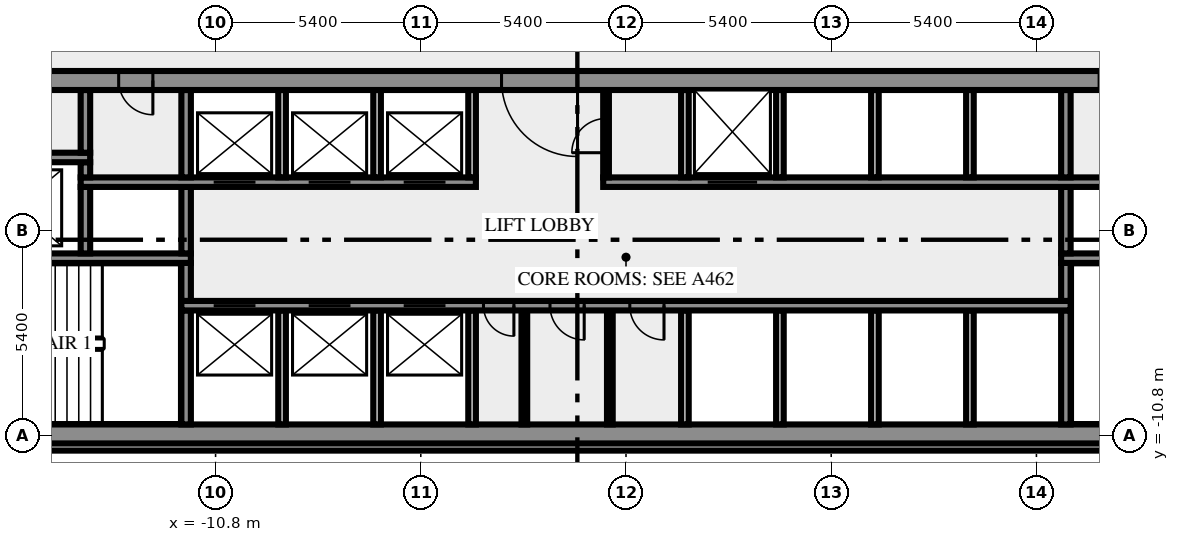
"""IFC4 building model, lengths in metres.
Left out: names, types, materials, properties, quantities, classifications, styles, units other than length and angle.
Written with IfcOpenShell. Run it as: python <this file> out.ifc"""

import sys

from ifc_helpers import new_model, si_unit, direction, frame, frame_2d, origin, place, context, subcontext, project, spatial, rectangle, extrude, element, fill, save


model = new_model("IFC4")
c1 = context("Model", 3, precision=1e-05, world=origin(), true_north=direction((0.0, 1.0)))
c2 = subcontext(c1, "Body", "Model", "MODEL_VIEW")
j1 = project(units=[si_unit("LENGTHUNIT", "METRE"), si_unit("PLANEANGLEUNIT", "RADIAN")], contexts=[c1])
p1 = place(None, origin())
s1 = spatial("IfcSite", under=j1, at=p1, CompositionType="ELEMENT")
p2 = place(p1, origin())
s2 = spatial("IfcBuilding", under=s1, at=p2, CompositionType="ELEMENT")
p3 = place(p2, frame((0.0, 0.0, 75.0)))
s3 = spatial("IfcBuildingStorey", under=s2, at=p3, CompositionType="ELEMENT", Elevation=75.0)
p4 = place(p3, frame((-17.444, -11.088, 0.0), z_axis=(0.0, 0.0, 1.0), x_axis=(1.0, 0.0, 0.0)))
e1 = element("IfcWall", 1, at=p4, inside=s3, PredefinedType="SOLIDWALL", context=c2, shape_type="SweptSolid", body=[
    extrude(rectangle(XDim=34.888, YDim=0.2, at=frame_2d((17.444, 0.0))), origin(), (0.0, 0.0, 1.0), 3.4),
])
p5 = place(p3, frame((-20.0, -10.75, 0.0), z_axis=(0.0, 0.0, 1.0), x_axis=(1.0, 0.0, 0.0)))
e2 = element("IfcWall", 2, at=p5, inside=s3, PredefinedType="SHEAR", context=c2, shape_type="SweptSolid", body=[
    extrude(rectangle(XDim=40.0, YDim=0.5, at=frame_2d((20.0, 0.0))), origin(), (0.0, 0.0, 1.0), 3.4),
])
p6 = place(p5, frame((0.8, 0.0, 1.0)))
e3 = element("IfcOpeningElement", 3, at=p6, cuts=e2, PredefinedType="OPENING", context=c2, shape_type="SweptSolid", body=[
    extrude(rectangle(XDim=1.2, YDim=1.2, at=frame_2d((0.6, 0.6))), frame((0.0, 0.26, 0.0), z_axis=(0.0, -1.0, 0.0), x_axis=(1.0, 0.0, 0.0)), (0.0, 0.0, 1.0), 0.52),
])
p7 = place(p5, frame((38.0, 0.0, 1.0)))
e4 = element("IfcOpeningElement", 4, at=p7, cuts=e2, PredefinedType="OPENING", context=c2, shape_type="SweptSolid", body=[
    extrude(rectangle(XDim=1.2, YDim=1.2, at=frame_2d((0.6, 0.6))), frame((0.0, 0.26, 0.0), z_axis=(0.0, -1.0, 0.0), x_axis=(1.0, 0.0, 0.0)), (0.0, 0.0, 1.0), 0.52),
])
p8 = place(p3, frame((-11.575, -10.5, 0.0), z_axis=(0.0, 0.0, 1.0), x_axis=(0.0, 1.0, 0.0)))
e5 = element("IfcWall", 5, at=p8, inside=s3, PredefinedType="SHEAR", context=c2, shape_type="SweptSolid", body=[
    extrude(rectangle(XDim=3.0, YDim=0.25, at=frame_2d((1.5, 0.0))), origin(), (0.0, 0.0, 1.0), 3.4),
])
for number, where, z_axis, x_axis in (
    (6, (-9.05, -10.5, 0.0), (0.0, 0.0, 1.0), (0.0, 1.0, 0.0)),
    (7, (-6.55, -10.5, 0.0), (0.0, 0.0, 1.0), (0.0, 1.0, 0.0)),
    (8, (-4.05, -10.5, 0.0), (0.0, 0.0, 1.0), (0.0, 1.0, 0.0)),
):
    element("IfcWall", number, at=place(p3, frame(where, z_axis=z_axis, x_axis=x_axis)), inside=s3, PredefinedType="SOLIDWALL", context=c2, shape_type="SweptSolid", body=[
        extrude(rectangle(XDim=3.0, YDim=0.2, at=frame_2d((1.5, 0.0))), origin(), (0.0, 0.0, 1.0), 3.4),
    ])
for number, where, z_axis, x_axis in (
    (9, (-2.675, -10.5, 0.0), (0.0, 0.0, 1.0), (0.0, 1.0, 0.0)),
    (10, (-0.425, -10.5, 0.0), (0.0, 0.0, 1.0), (0.0, 1.0, 0.0)),
):
    element("IfcWall", number, at=place(p3, frame(where, z_axis=z_axis, x_axis=x_axis)), inside=s3, PredefinedType="PARTITIONING", context=c2, shape_type="SweptSolid", body=[
        extrude(rectangle(XDim=3.0, YDim=0.15, at=frame_2d((1.5, 0.0))), origin(), (0.0, 0.0, 1.0), 3.4),
    ])
for number, where, z_axis, x_axis in (
    (11, (1.55, -10.5, 0.0), (0.0, 0.0, 1.0), (0.0, 1.0, 0.0)),
    (12, (4.05, -10.5, 0.0), (0.0, 0.0, 1.0), (0.0, 1.0, 0.0)),
    (13, (6.55, -10.5, 0.0), (0.0, 0.0, 1.0), (0.0, 1.0, 0.0)),
    (14, (9.05, -10.5, 0.0), (0.0, 0.0, 1.0), (0.0, 1.0, 0.0)),
):
    element("IfcWall", number, at=place(p3, frame(where, z_axis=z_axis, x_axis=x_axis)), inside=s3, PredefinedType="SOLIDWALL", context=c2, shape_type="SweptSolid", body=[
        extrude(rectangle(XDim=3.0, YDim=0.2, at=frame_2d((1.5, 0.0))), origin(), (0.0, 0.0, 1.0), 3.4),
    ])
p9 = place(p3, frame((11.575, -10.5, 0.0), z_axis=(0.0, 0.0, 1.0), x_axis=(0.0, 1.0, 0.0)))
e15 = element("IfcWall", 15, at=p9, inside=s3, PredefinedType="SHEAR", context=c2, shape_type="SweptSolid", body=[
    extrude(rectangle(XDim=3.0, YDim=0.25, at=frame_2d((1.5, 0.0))), origin(), (0.0, 0.0, 1.0), 3.4),
])
p10 = place(p3, frame((11.7, -7.375, 0.0), z_axis=(0.0, 0.0, 1.0), x_axis=(-1.0, 0.0, 0.0)))
e16 = element("IfcWall", 16, at=p10, inside=s3, PredefinedType="SHEAR", context=c2, shape_type="SweptSolid", body=[
    extrude(rectangle(XDim=23.4, YDim=0.25, at=frame_2d((11.7, 0.0))), origin(), (0.0, 0.0, 1.0), 3.4),
])
p11 = place(p10, frame((21.45, 0.0, 0.0)))
e17 = element("IfcOpeningElement", 17, at=p11, cuts=e16, PredefinedType="OPENING", context=c2, shape_type="SweptSolid", body=[
    extrude(rectangle(XDim=1.1, YDim=2.1, at=frame_2d((0.55, 1.05))), frame((0.0, 0.135, 0.0), z_axis=(0.0, -1.0, 0.0), x_axis=(1.0, 0.0, 0.0)), (0.0, 0.0, 1.0), 0.27),
])
p12 = place(p10, frame((18.95, 0.0, 0.0)))
e18 = element("IfcOpeningElement", 18, at=p12, cuts=e16, PredefinedType="OPENING", context=c2, shape_type="SweptSolid", body=[
    extrude(rectangle(XDim=1.1, YDim=2.1, at=frame_2d((0.55, 1.05))), frame((0.0, 0.135, 0.0), z_axis=(0.0, -1.0, 0.0), x_axis=(1.0, 0.0, 0.0)), (0.0, 0.0, 1.0), 0.27),
])
p13 = place(p10, frame((16.45, 0.0, 0.0)))
e19 = element("IfcOpeningElement", 19, at=p13, cuts=e16, PredefinedType="OPENING", context=c2, shape_type="SweptSolid", body=[
    extrude(rectangle(XDim=1.1, YDim=2.1, at=frame_2d((0.55, 1.05))), frame((0.0, 0.135, 0.0), z_axis=(0.0, -1.0, 0.0), x_axis=(1.0, 0.0, 0.0)), (0.0, 0.0, 1.0), 0.27),
])
p14 = place(p10, frame((14.65, 0.0, 0.0)))
e20 = element("IfcOpeningElement", 20, at=p14, cuts=e16, PredefinedType="OPENING", context=c2, shape_type="SweptSolid", body=[
    extrude(rectangle(XDim=0.8, YDim=2.1, at=frame_2d((0.4, 1.05))), frame((0.0, 0.135, 0.0), z_axis=(0.0, -1.0, 0.0), x_axis=(1.0, 0.0, 0.0)), (0.0, 0.0, 1.0), 0.27),
])
p15 = place(p10, frame((12.8, 0.0, 0.0)))
e21 = element("IfcOpeningElement", 21, at=p15, cuts=e16, PredefinedType="OPENING", context=c2, shape_type="SweptSolid", body=[
    extrude(rectangle(XDim=0.9, YDim=2.1, at=frame_2d((0.45, 1.05))), frame((0.0, 0.135, 0.0), z_axis=(0.0, -1.0, 0.0), x_axis=(1.0, 0.0, 0.0)), (0.0, 0.0, 1.0), 0.27),
])
p16 = place(p10, frame((10.7, 0.0, 0.0)))
e22 = element("IfcOpeningElement", 22, at=p16, cuts=e16, PredefinedType="OPENING", context=c2, shape_type="SweptSolid", body=[
    extrude(rectangle(XDim=0.9, YDim=2.1, at=frame_2d((0.45, 1.05))), frame((0.0, 0.135, 0.0), z_axis=(0.0, -1.0, 0.0), x_axis=(1.0, 0.0, 0.0)), (0.0, 0.0, 1.0), 0.27),
])
for number, where, z_axis, x_axis in (
    (23, (-11.575, -7.25, 0.0), (0.0, 0.0, 1.0), (0.0, 1.0, 0.0)),
    (24, (11.575, -7.25, 0.0), (0.0, 0.0, 1.0), (0.0, 1.0, 0.0)),
):
    element("IfcWall", number, at=place(p3, frame(where, z_axis=z_axis, x_axis=x_axis)), inside=s3, PredefinedType="SHEAR", context=c2, shape_type="SweptSolid", body=[
        extrude(rectangle(XDim=1.0, YDim=0.25, at=frame_2d((0.5, 0.0))), origin(), (0.0, 0.0, 1.0), 3.4),
    ])
p17 = place(p3, frame((-11.45, -6.125, 0.0), z_axis=(0.0, 0.0, 1.0), x_axis=(-1.0, 0.0, 0.0)))
e25 = element("IfcWall", 25, at=p17, inside=s3, PredefinedType="SHEAR", context=c2, shape_type="SweptSolid", body=[
    extrude(rectangle(XDim=8.05, YDim=0.25, at=frame_2d((4.025, 0.0))), origin(), (0.0, 0.0, 1.0), 3.4),
])
p18 = place(p17, frame((6.2, 0.0, 0.0)))
e26 = element("IfcOpeningElement", 26, at=p18, cuts=e25, PredefinedType="OPENING", context=c2, shape_type="SweptSolid", body=[
    extrude(rectangle(XDim=1.8, YDim=2.1, at=frame_2d((0.9, 1.05))), frame((0.0, 0.135, 0.0), z_axis=(0.0, -1.0, 0.0), x_axis=(1.0, 0.0, 0.0)), (0.0, 0.0, 1.0), 0.27),
])
p19 = place(p3, frame((19.5, -6.125, 0.0), z_axis=(0.0, 0.0, 1.0), x_axis=(-1.0, 0.0, 0.0)))
e27 = element("IfcWall", 27, at=p19, inside=s3, PredefinedType="SHEAR", context=c2, shape_type="SweptSolid", body=[
    extrude(rectangle(XDim=8.05, YDim=0.25, at=frame_2d((4.025, 0.0))), origin(), (0.0, 0.0, 1.0), 3.4),
])
p20 = place(p19, frame((0.05, 0.0, 0.0)))
e28 = element("IfcOpeningElement", 28, at=p20, cuts=e27, PredefinedType="OPENING", context=c2, shape_type="SweptSolid", body=[
    extrude(rectangle(XDim=1.8, YDim=2.1, at=frame_2d((0.9, 1.05))), frame((0.0, 0.135, 0.0), z_axis=(0.0, -1.0, 0.0), x_axis=(1.0, 0.0, 0.0)), (0.0, 0.0, 1.0), 0.27),
])
for number, where, z_axis, x_axis in (
    (29, (-14.225, -6.0, 0.0), (0.0, 0.0, 1.0), (0.0, 1.0, 0.0)),
    (30, (-11.575, -6.0, 0.0), (0.0, 0.0, 1.0), (0.0, 1.0, 0.0)),
    (31, (11.575, -6.0, 0.0), (0.0, 0.0, 1.0), (0.0, 1.0, 0.0)),
):
    element("IfcWall", number, at=place(p3, frame(where, z_axis=z_axis, x_axis=x_axis)), inside=s3, PredefinedType="SHEAR", context=c2, shape_type="SweptSolid", body=[
        extrude(rectangle(XDim=1.75, YDim=0.25, at=frame_2d((0.875, 0.0))), origin(), (0.0, 0.0, 1.0), 3.4),
    ])
p21 = place(p3, frame((-14.35, -4.125, 0.0), z_axis=(0.0, 0.0, 1.0), x_axis=(1.0, 0.0, 0.0)))
e32 = element("IfcWall", 32, at=p21, inside=s3, PredefinedType="SHEAR", context=c2, shape_type="SweptSolid", body=[
    extrude(rectangle(XDim=10.4, YDim=0.25, at=frame_2d((5.2, 0.0))), origin(), (0.0, 0.0, 1.0), 3.4),
])
p22 = place(p21, frame((3.5, 0.0, 0.0)))
e33 = element("IfcOpeningElement", 33, at=p22, cuts=e32, PredefinedType="OPENING", context=c2, shape_type="SweptSolid", body=[
    extrude(rectangle(XDim=1.1, YDim=2.1, at=frame_2d((0.55, 1.05))), frame((0.0, 0.135, 0.0), z_axis=(0.0, -1.0, 0.0), x_axis=(1.0, 0.0, 0.0)), (0.0, 0.0, 1.0), 0.27),
])
p23 = place(p21, frame((6.0, 0.0, 0.0)))
e34 = element("IfcOpeningElement", 34, at=p23, cuts=e32, PredefinedType="OPENING", context=c2, shape_type="SweptSolid", body=[
    extrude(rectangle(XDim=1.1, YDim=2.1, at=frame_2d((0.55, 1.05))), frame((0.0, 0.135, 0.0), z_axis=(0.0, -1.0, 0.0), x_axis=(1.0, 0.0, 0.0)), (0.0, 0.0, 1.0), 0.27),
])
p24 = place(p21, frame((8.5, 0.0, 0.0)))
e35 = element("IfcOpeningElement", 35, at=p24, cuts=e32, PredefinedType="OPENING", context=c2, shape_type="SweptSolid", body=[
    extrude(rectangle(XDim=1.1, YDim=2.1, at=frame_2d((0.55, 1.05))), frame((0.0, 0.135, 0.0), z_axis=(0.0, -1.0, 0.0), x_axis=(1.0, 0.0, 0.0)), (0.0, 0.0, 1.0), 0.27),
])
p25 = place(p3, frame((-0.6, -4.125, 0.0), z_axis=(0.0, 0.0, 1.0), x_axis=(1.0, 0.0, 0.0)))
e36 = element("IfcWall", 36, at=p25, inside=s3, PredefinedType="SHEAR", context=c2, shape_type="SweptSolid", body=[
    extrude(rectangle(XDim=14.95, YDim=0.25, at=frame_2d((7.475, 0.0))), origin(), (0.0, 0.0, 1.0), 3.4),
])
p26 = place(p25, frame((2.75, 0.0, 0.0)))
e37 = element("IfcOpeningElement", 37, at=p26, cuts=e36, PredefinedType="OPENING", context=c2, shape_type="SweptSolid", body=[
    extrude(rectangle(XDim=1.3, YDim=2.1, at=frame_2d((0.65, 1.05))), frame((0.0, 0.135, 0.0), z_axis=(0.0, -1.0, 0.0), x_axis=(1.0, 0.0, 0.0)), (0.0, 0.0, 1.0), 0.27),
])
p27 = place(p3, frame((-14.225, -4.0, 0.0), z_axis=(0.0, 0.0, 1.0), x_axis=(0.0, 1.0, 0.0)))
e38 = element("IfcWall", 38, at=p27, inside=s3, PredefinedType="SHEAR", context=c2, shape_type="SweptSolid", body=[
    extrude(rectangle(XDim=0.4, YDim=0.25, at=frame_2d((0.2, 0.0))), origin(), (0.0, 0.0, 1.0), 3.4),
])
p28 = place(p3, frame((-11.575, -4.0, 0.0), z_axis=(0.0, 0.0, 1.0), x_axis=(0.0, 1.0, 0.0)))
e39 = element("IfcWall", 39, at=p28, inside=s3, PredefinedType="SHEAR", context=c2, shape_type="SweptSolid", body=[
    extrude(rectangle(XDim=2.3, YDim=0.25, at=frame_2d((1.15, 0.0))), origin(), (0.0, 0.0, 1.0), 3.4),
])
for number, where, z_axis, x_axis in (
    (40, (-9.05, -4.0, 0.0), (0.0, 0.0, 1.0), (0.0, 1.0, 0.0)),
    (41, (-6.55, -4.0, 0.0), (0.0, 0.0, 1.0), (0.0, 1.0, 0.0)),
    (42, (-4.05, -4.0, 0.0), (0.0, 0.0, 1.0), (0.0, 1.0, 0.0)),
):
    element("IfcWall", number, at=place(p3, frame(where, z_axis=z_axis, x_axis=x_axis)), inside=s3, PredefinedType="SOLIDWALL", context=c2, shape_type="SweptSolid", body=[
        extrude(rectangle(XDim=2.3, YDim=0.2, at=frame_2d((1.15, 0.0))), origin(), (0.0, 0.0, 1.0), 3.4),
    ])
p29 = place(p3, frame((-0.525, -4.0, 0.0), z_axis=(0.0, 0.0, 1.0), x_axis=(0.0, 1.0, 0.0)))
e43 = element("IfcWall", 43, at=p29, inside=s3, PredefinedType="PARTITIONING", context=c2, shape_type="SweptSolid", body=[
    extrude(rectangle(XDim=2.3, YDim=0.15, at=frame_2d((1.15, 0.0))), origin(), (0.0, 0.0, 1.0), 3.4),
])
p30 = place(p29, frame((0.65, 0.0, 0.0)))
e44 = element("IfcOpeningElement", 44, at=p30, cuts=e43, PredefinedType="OPENING", context=c2, shape_type="SweptSolid", body=[
    extrude(rectangle(XDim=0.9, YDim=2.1, at=frame_2d((0.45, 1.05))), frame((0.0, 0.085, 0.0), z_axis=(0.0, -1.0, 0.0), x_axis=(1.0, 0.0, 0.0)), (0.0, 0.0, 1.0), 0.17),
])
for number, where, z_axis, x_axis in (
    (45, (1.55, -4.0, 0.0), (0.0, 0.0, 1.0), (0.0, 1.0, 0.0)),
    (46, (4.05, -4.0, 0.0), (0.0, 0.0, 1.0), (0.0, 1.0, 0.0)),
    (47, (6.55, -4.0, 0.0), (0.0, 0.0, 1.0), (0.0, 1.0, 0.0)),
    (48, (9.05, -4.0, 0.0), (0.0, 0.0, 1.0), (0.0, 1.0, 0.0)),
):
    element("IfcWall", number, at=place(p3, frame(where, z_axis=z_axis, x_axis=x_axis)), inside=s3, PredefinedType="SOLIDWALL", context=c2, shape_type="SweptSolid", body=[
        extrude(rectangle(XDim=2.3, YDim=0.2, at=frame_2d((1.15, 0.0))), origin(), (0.0, 0.0, 1.0), 3.4),
    ])
p31 = place(p3, frame((11.575, -4.0, 0.0), z_axis=(0.0, 0.0, 1.0), x_axis=(0.0, 1.0, 0.0)))
e49 = element("IfcWall", 49, at=p31, inside=s3, PredefinedType="SHEAR", context=c2, shape_type="SweptSolid", body=[
    extrude(rectangle(XDim=2.3, YDim=0.25, at=frame_2d((1.15, 0.0))), origin(), (0.0, 0.0, 1.0), 3.4),
])
p32 = place(p3, frame((-17.35, -3.475, 0.0), z_axis=(0.0, 0.0, 1.0), x_axis=(1.0, 0.0, 0.0)))
e50 = element("IfcWall", 50, at=p32, inside=s3, PredefinedType="SHEAR", context=c2, shape_type="SweptSolid", body=[
    extrude(rectangle(XDim=3.25, YDim=0.25, at=frame_2d((1.625, 0.0))), origin(), (0.0, 0.0, 1.0), 3.4),
])
p33 = place(p3, frame((-14.225, -3.35, 0.0), z_axis=(0.0, 0.0, 1.0), x_axis=(0.0, 1.0, 0.0)))
e51 = element("IfcWall", 51, at=p33, inside=s3, PredefinedType="SHEAR", context=c2, shape_type="SweptSolid", body=[
    extrude(rectangle(XDim=1.65, YDim=0.25, at=frame_2d((0.825, 0.0))), origin(), (0.0, 0.0, 1.0), 3.4),
])
p34 = place(p3, frame((20.49, -1.45, 0.0), z_axis=(0.0, 0.0, 1.0), x_axis=(-1.0, 0.0, 0.0)))
e52 = element("IfcWall", 52, at=p34, inside=s3, PredefinedType="SHEAR", context=c2, shape_type="SweptSolid", body=[
    extrude(rectangle(XDim=40.98, YDim=0.5, at=frame_2d((20.49, 0.0))), origin(), (0.0, 0.0, 1.0), 3.4),
])
p35 = place(p34, frame((38.14, 0.0, 0.0)))
e53 = element("IfcOpeningElement", 53, at=p35, cuts=e52, PredefinedType="OPENING", context=c2, shape_type="SweptSolid", body=[
    extrude(rectangle(XDim=1.8, YDim=2.1, at=frame_2d((0.9, 1.05))), frame((0.0, 0.26, 0.0), z_axis=(0.0, -1.0, 0.0), x_axis=(1.0, 0.0, 0.0)), (0.0, 0.0, 1.0), 0.52),
])
p36 = place(p34, frame((35.89, 0.0, 0.0)))
e54 = element("IfcOpeningElement", 54, at=p36, cuts=e52, PredefinedType="OPENING", context=c2, shape_type="SweptSolid", body=[
    extrude(rectangle(XDim=0.9, YDim=2.1, at=frame_2d((0.45, 1.05))), frame((0.0, 0.26, 0.0), z_axis=(0.0, -1.0, 0.0), x_axis=(1.0, 0.0, 0.0)), (0.0, 0.0, 1.0), 0.52),
])
p37 = place(p34, frame((32.94, 0.0, 0.0)))
e55 = element("IfcOpeningElement", 55, at=p37, cuts=e52, PredefinedType="OPENING", context=c2, shape_type="SweptSolid", body=[
    extrude(rectangle(XDim=0.9, YDim=2.1, at=frame_2d((0.45, 1.05))), frame((0.0, 0.26, 0.0), z_axis=(0.0, -1.0, 0.0), x_axis=(1.0, 0.0, 0.0)), (0.0, 0.0, 1.0), 0.52),
])
p38 = place(p34, frame((21.765, 0.0, 0.0)))
e56 = element("IfcOpeningElement", 56, at=p38, cuts=e52, PredefinedType="OPENING", context=c2, shape_type="SweptSolid", body=[
    extrude(rectangle(XDim=2.0, YDim=2.1, at=frame_2d((1.0, 1.05))), frame((0.0, 0.26, 0.0), z_axis=(0.0, -1.0, 0.0), x_axis=(1.0, 0.0, 0.0)), (0.0, 0.0, 1.0), 0.52),
])
p39 = place(p34, frame((7.14, 0.0, 0.0)))
e57 = element("IfcOpeningElement", 57, at=p39, cuts=e52, PredefinedType="OPENING", context=c2, shape_type="SweptSolid", body=[
    extrude(rectangle(XDim=0.9, YDim=2.1, at=frame_2d((0.45, 1.05))), frame((0.0, 0.26, 0.0), z_axis=(0.0, -1.0, 0.0), x_axis=(1.0, 0.0, 0.0)), (0.0, 0.0, 1.0), 0.52),
])
p40 = place(p34, frame((5.028, 0.0, 0.0)))
e58 = element("IfcOpeningElement", 58, at=p40, cuts=e52, PredefinedType="OPENING", context=c2, shape_type="SweptSolid", body=[
    extrude(rectangle(XDim=0.8, YDim=2.1, at=frame_2d((0.4, 1.05))), frame((0.0, 0.26, 0.0), z_axis=(0.0, -1.0, 0.0), x_axis=(1.0, 0.0, 0.0)), (0.0, 0.0, 1.0), 0.52),
])
p41 = place(p34, frame((3.452, 0.0, 0.0)))
e59 = element("IfcOpeningElement", 59, at=p41, cuts=e52, PredefinedType="OPENING", context=c2, shape_type="SweptSolid", body=[
    extrude(rectangle(XDim=0.8, YDim=2.1, at=frame_2d((0.4, 1.05))), frame((0.0, 0.26, 0.0), z_axis=(0.0, -1.0, 0.0), x_axis=(1.0, 0.0, 0.0)), (0.0, 0.0, 1.0), 0.52),
])
p42 = place(p34, frame((1.04, 0.0, 0.0)))
e60 = element("IfcOpeningElement", 60, at=p42, cuts=e52, PredefinedType="OPENING", context=c2, shape_type="SweptSolid", body=[
    extrude(rectangle(XDim=1.8, YDim=2.1, at=frame_2d((0.9, 1.05))), frame((0.0, 0.26, 0.0), z_axis=(0.0, -1.0, 0.0), x_axis=(1.0, 0.0, 0.0)), (0.0, 0.0, 1.0), 0.52),
])
p43 = place(p11, origin())
e61 = element("IfcDoor", 61, at=p43, inside=s3, OperationType="DOUBLE_DOOR_SLIDING", PredefinedType="DOOR", context=c2, shape_type="SweptSolid", body=[
    extrude(rectangle(XDim=1.1, YDim=2.1, at=frame_2d((0.55, 1.05))), frame((0.0, 0.025, 0.0), z_axis=(0.0, -1.0, 0.0), x_axis=(1.0, 0.0, 0.0)), (0.0, 0.0, 1.0), 0.05),
])
fill(e17, e61)
p44 = place(p12, origin())
e62 = element("IfcDoor", 62, at=p44, inside=s3, OperationType="DOUBLE_DOOR_SLIDING", PredefinedType="DOOR", context=c2, shape_type="SweptSolid", body=[
    extrude(rectangle(XDim=1.1, YDim=2.1, at=frame_2d((0.55, 1.05))), frame((0.0, 0.025, 0.0), z_axis=(0.0, -1.0, 0.0), x_axis=(1.0, 0.0, 0.0)), (0.0, 0.0, 1.0), 0.05),
])
fill(e18, e62)
p45 = place(p13, origin())
e63 = element("IfcDoor", 63, at=p45, inside=s3, OperationType="DOUBLE_DOOR_SLIDING", PredefinedType="DOOR", context=c2, shape_type="SweptSolid", body=[
    extrude(rectangle(XDim=1.1, YDim=2.1, at=frame_2d((0.55, 1.05))), frame((0.0, 0.025, 0.0), z_axis=(0.0, -1.0, 0.0), x_axis=(1.0, 0.0, 0.0)), (0.0, 0.0, 1.0), 0.05),
])
fill(e19, e63)
p46 = place(p14, origin())
e64 = element("IfcDoor", 64, at=p46, inside=s3, OperationType="SINGLE_SWING_RIGHT", PredefinedType="DOOR", context=c2, shape_type="SweptSolid", body=[
    extrude(rectangle(XDim=0.8, YDim=2.1, at=frame_2d((0.4, 1.05))), frame((0.0, 0.025, 0.0), z_axis=(0.0, -1.0, 0.0), x_axis=(1.0, 0.0, 0.0)), (0.0, 0.0, 1.0), 0.05),
])
fill(e20, e64)
p47 = place(p15, origin())
e65 = element("IfcDoor", 65, at=p47, inside=s3, OperationType="SINGLE_SWING_RIGHT", PredefinedType="DOOR", context=c2, shape_type="SweptSolid", body=[
    extrude(rectangle(XDim=0.9, YDim=2.1, at=frame_2d((0.45, 1.05))), frame((0.0, 0.025, 0.0), z_axis=(0.0, -1.0, 0.0), x_axis=(1.0, 0.0, 0.0)), (0.0, 0.0, 1.0), 0.05),
])
fill(e21, e65)
p48 = place(p16, origin())
e66 = element("IfcDoor", 66, at=p48, inside=s3, OperationType="SINGLE_SWING_LEFT", PredefinedType="DOOR", context=c2, shape_type="SweptSolid", body=[
    extrude(rectangle(XDim=0.9, YDim=2.1, at=frame_2d((0.45, 1.05))), frame((0.0, 0.025, 0.0), z_axis=(0.0, -1.0, 0.0), x_axis=(1.0, 0.0, 0.0)), (0.0, 0.0, 1.0), 0.05),
])
fill(e22, e66)
p49 = place(p22, origin())
e67 = element("IfcDoor", 67, at=p49, inside=s3, OperationType="DOUBLE_DOOR_SLIDING", PredefinedType="DOOR", context=c2, shape_type="SweptSolid", body=[
    extrude(rectangle(XDim=1.1, YDim=2.1, at=frame_2d((0.55, 1.05))), frame((0.0, 0.025, 0.0), z_axis=(0.0, -1.0, 0.0), x_axis=(1.0, 0.0, 0.0)), (0.0, 0.0, 1.0), 0.05),
])
fill(e33, e67)
p50 = place(p23, origin())
e68 = element("IfcDoor", 68, at=p50, inside=s3, OperationType="DOUBLE_DOOR_SLIDING", PredefinedType="DOOR", context=c2, shape_type="SweptSolid", body=[
    extrude(rectangle(XDim=1.1, YDim=2.1, at=frame_2d((0.55, 1.05))), frame((0.0, 0.025, 0.0), z_axis=(0.0, -1.0, 0.0), x_axis=(1.0, 0.0, 0.0)), (0.0, 0.0, 1.0), 0.05),
])
fill(e34, e68)
p51 = place(p24, origin())
e69 = element("IfcDoor", 69, at=p51, inside=s3, OperationType="DOUBLE_DOOR_SLIDING", PredefinedType="DOOR", context=c2, shape_type="SweptSolid", body=[
    extrude(rectangle(XDim=1.1, YDim=2.1, at=frame_2d((0.55, 1.05))), frame((0.0, 0.025, 0.0), z_axis=(0.0, -1.0, 0.0), x_axis=(1.0, 0.0, 0.0)), (0.0, 0.0, 1.0), 0.05),
])
fill(e35, e69)
p52 = place(p26, origin())
e70 = element("IfcDoor", 70, at=p52, inside=s3, OperationType="DOUBLE_DOOR_SLIDING", PredefinedType="DOOR", context=c2, shape_type="SweptSolid", body=[
    extrude(rectangle(XDim=1.3, YDim=2.1, at=frame_2d((0.65, 1.05))), frame((0.0, 0.025, 0.0), z_axis=(0.0, -1.0, 0.0), x_axis=(1.0, 0.0, 0.0)), (0.0, 0.0, 1.0), 0.05),
])
fill(e37, e70)
p53 = place(p30, origin())
e71 = element("IfcDoor", 71, at=p53, inside=s3, OperationType="SINGLE_SWING_LEFT", PredefinedType="DOOR", context=c2, shape_type="SweptSolid", body=[
    extrude(rectangle(XDim=0.9, YDim=2.1, at=frame_2d((0.45, 1.05))), frame((0.0, 0.025, 0.0), z_axis=(0.0, -1.0, 0.0), x_axis=(1.0, 0.0, 0.0)), (0.0, 0.0, 1.0), 0.05),
])
fill(e44, e71)
p54 = place(p37, origin())
e72 = element("IfcDoor", 72, at=p54, inside=s3, OperationType="SINGLE_SWING_RIGHT", PredefinedType="DOOR", context=c2, shape_type="SweptSolid", body=[
    extrude(rectangle(XDim=0.9, YDim=2.1, at=frame_2d((0.45, 1.05))), frame((0.0, 0.025, 0.0), z_axis=(0.0, -1.0, 0.0), x_axis=(1.0, 0.0, 0.0)), (0.0, 0.0, 1.0), 0.05),
])
fill(e55, e72)
p55 = place(p38, origin())
e73 = element("IfcDoor", 73, at=p55, inside=s3, OperationType="DOUBLE_DOOR_SINGLE_SWING", PredefinedType="DOOR", context=c2, shape_type="SweptSolid", body=[
    extrude(rectangle(XDim=2.0, YDim=2.1, at=frame_2d((1.0, 1.05))), frame((0.0, 0.025, 0.0), z_axis=(0.0, -1.0, 0.0), x_axis=(1.0, 0.0, 0.0)), (0.0, 0.0, 1.0), 0.05),
])
fill(e56, e73)
save(model, sys.argv[1])
